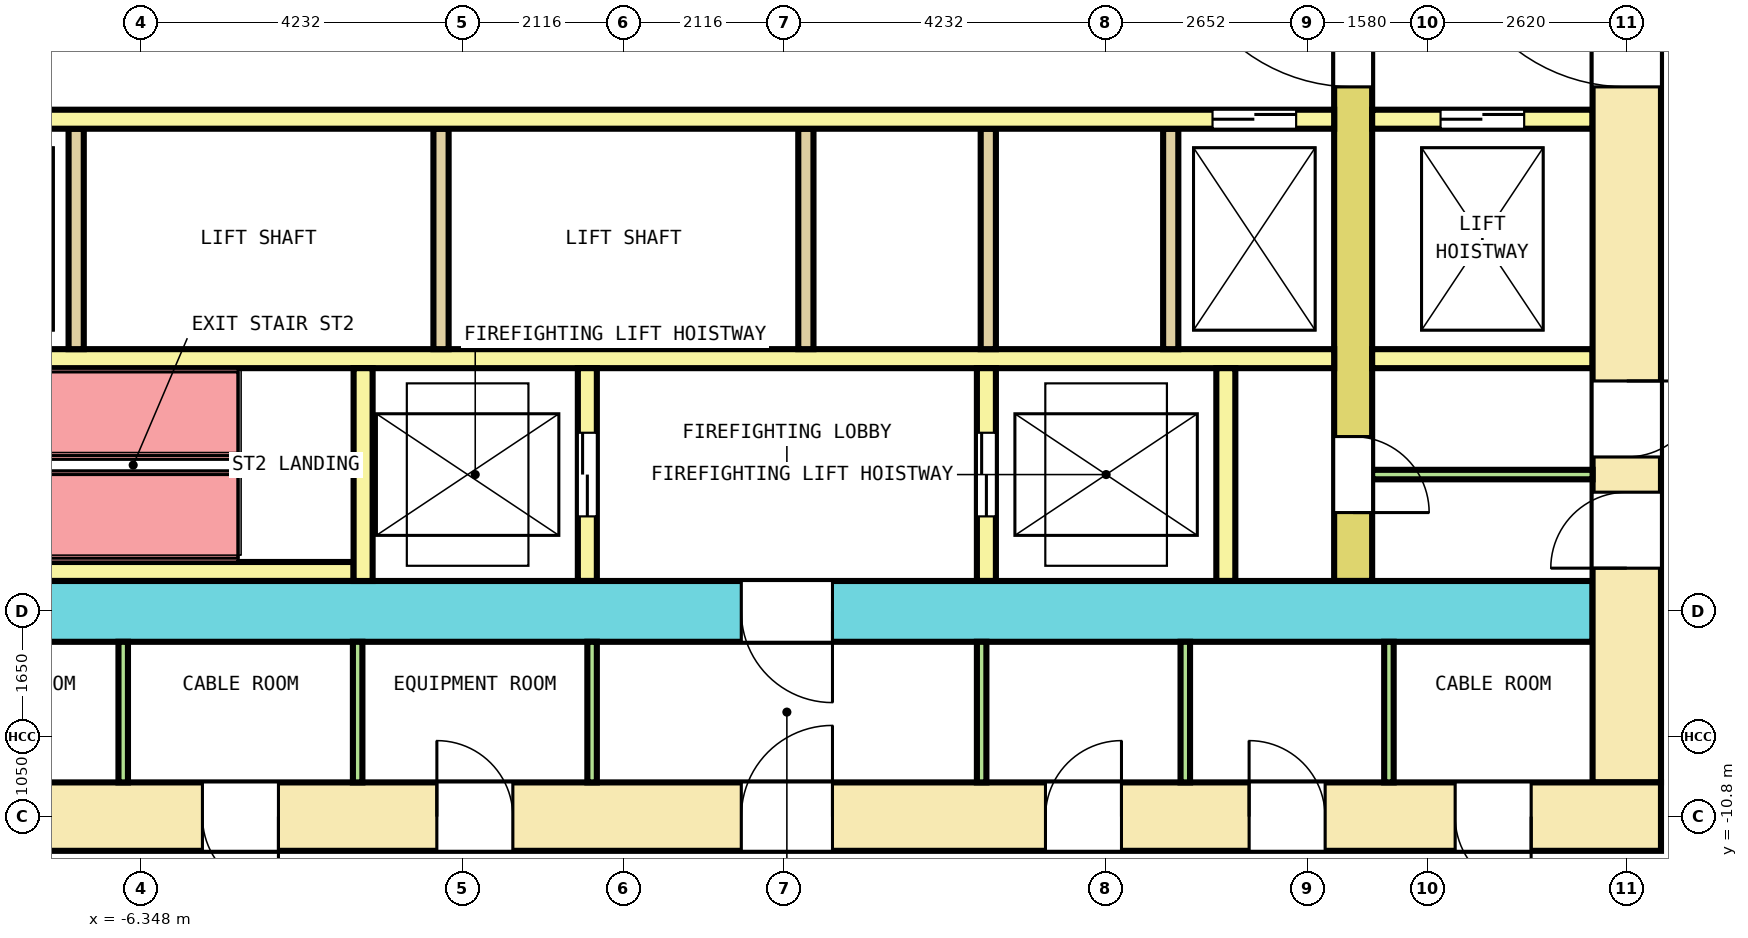
"""IFC4 building model, lengths in metres.
Left out: names, types, materials, properties, quantities, classifications, styles, units other than length and angle.
Written with IfcOpenShell. Run it as: python <this file> out.ifc"""

import sys

from ifc_helpers import new_model, si_unit, direction, frame, frame_2d, origin, place, context, subcontext, project, spatial, rectangle, extrude, element, fill, save


model = new_model("IFC4")
c1 = context("Model", 3, precision=1e-05, world=origin(), true_north=direction((0.0, 1.0)))
c2 = subcontext(c1, "Body", "Model", "MODEL_VIEW")
j1 = project(units=[si_unit("LENGTHUNIT", "METRE"), si_unit("PLANEANGLEUNIT", "RADIAN")], contexts=[c1])
p1 = place(None, origin())
s1 = spatial("IfcSite", under=j1, at=p1, CompositionType="ELEMENT")
p2 = place(p1, origin())
s2 = spatial("IfcBuilding", under=s1, at=p2, CompositionType="ELEMENT")
p3 = place(p2, frame((0.0, 0.0, 54.2)))
s3 = spatial("IfcBuildingStorey", under=s2, at=p3, CompositionType="ELEMENT", Elevation=54.2)
p4 = place(p3, frame((-13.65, -10.8, 0.0), z_axis=(0.0, 0.0, 1.0), x_axis=(1.0, 0.0, 0.0)))
e1 = element("IfcWall", 1, at=p4, inside=s3, PredefinedType="SHEAR", context=c2, shape_type="SweptSolid", body=[
    extrude(rectangle(XDim=27.3, YDim=0.9, at=frame_2d((13.65, 0.0))), origin(), (0.0, 0.0, 1.0), 4.1),
])
p5 = place(p4, frame((1.911, 0.0, 0.0)))
e2 = element("IfcOpeningElement", 2, at=p5, cuts=e1, PredefinedType="OPENING", context=c2, shape_type="SweptSolid", body=[
    extrude(rectangle(XDim=1.0, YDim=2.1, at=frame_2d((0.5, 1.05))), frame((0.0, 0.46, 0.0), z_axis=(0.0, -1.0, 0.0), x_axis=(1.0, 0.0, 0.0)), (0.0, 0.0, 1.0), 0.92),
])
p6 = place(p4, frame((5.027, 0.0, 0.0)))
e3 = element("IfcOpeningElement", 3, at=p6, cuts=e1, PredefinedType="OPENING", context=c2, shape_type="SweptSolid", body=[
    extrude(rectangle(XDim=1.0, YDim=2.1, at=frame_2d((0.5, 1.05))), frame((0.0, 0.46, 0.0), z_axis=(0.0, -1.0, 0.0), x_axis=(1.0, 0.0, 0.0)), (0.0, 0.0, 1.0), 0.92),
])
p7 = place(p4, frame((8.111, 0.0, 0.0)))
e4 = element("IfcOpeningElement", 4, at=p7, cuts=e1, PredefinedType="OPENING", context=c2, shape_type="SweptSolid", body=[
    extrude(rectangle(XDim=1.0, YDim=2.1, at=frame_2d((0.5, 1.05))), frame((0.0, 0.46, 0.0), z_axis=(0.0, -1.0, 0.0), x_axis=(1.0, 0.0, 0.0)), (0.0, 0.0, 1.0), 0.92),
])
p8 = place(p4, frame((11.195, 0.0, 0.0)))
e5 = element("IfcOpeningElement", 5, at=p8, cuts=e1, PredefinedType="OPENING", context=c2, shape_type="SweptSolid", body=[
    extrude(rectangle(XDim=1.0, YDim=2.1, at=frame_2d((0.5, 1.05))), frame((0.0, 0.46, 0.0), z_axis=(0.0, -1.0, 0.0), x_axis=(1.0, 0.0, 0.0)), (0.0, 0.0, 1.0), 0.92),
])
p9 = place(p4, frame((19.202, 0.0, 0.0)))
e6 = element("IfcOpeningElement", 6, at=p9, cuts=e1, PredefinedType="OPENING", context=c2, shape_type="SweptSolid", body=[
    extrude(rectangle(XDim=1.0, YDim=2.1, at=frame_2d((0.5, 1.05))), frame((0.0, 0.46, 0.0), z_axis=(0.0, -1.0, 0.0), x_axis=(1.0, 0.0, 0.0)), (0.0, 0.0, 1.0), 0.92),
])
p10 = place(p4, frame((21.881, 0.0, 0.0)))
e7 = element("IfcOpeningElement", 7, at=p10, cuts=e1, PredefinedType="OPENING", context=c2, shape_type="SweptSolid", body=[
    extrude(rectangle(XDim=1.0, YDim=2.1, at=frame_2d((0.5, 1.05))), frame((0.0, 0.46, 0.0), z_axis=(0.0, -1.0, 0.0), x_axis=(1.0, 0.0, 0.0)), (0.0, 0.0, 1.0), 0.92),
])
p11 = place(p4, frame((24.592, 0.0, 0.0)))
e8 = element("IfcOpeningElement", 8, at=p11, cuts=e1, PredefinedType="OPENING", context=c2, shape_type="SweptSolid", body=[
    extrude(rectangle(XDim=1.0, YDim=2.1, at=frame_2d((0.5, 1.05))), frame((0.0, 0.46, 0.0), z_axis=(0.0, -1.0, 0.0), x_axis=(1.0, 0.0, 0.0)), (0.0, 0.0, 1.0), 0.92),
])
p12 = place(p4, frame((15.2, 0.0, 0.0)))
e9 = element("IfcOpeningElement", 9, at=p12, cuts=e1, PredefinedType="OPENING", context=c2, shape_type="SweptSolid", body=[
    extrude(rectangle(XDim=1.2, YDim=2.1, at=frame_2d((0.6, 1.05))), frame((0.0, 0.46, 0.0), z_axis=(0.0, -1.0, 0.0), x_axis=(1.0, 0.0, 0.0)), (0.0, 0.0, 1.0), 0.92),
])
p13 = place(p3, frame((13.2, -10.35, 0.0), z_axis=(0.0, 0.0, 1.0), x_axis=(0.0, 1.0, 0.0)))
e10 = element("IfcWall", 10, at=p13, inside=s3, PredefinedType="SHEAR", context=c2, shape_type="SweptSolid", body=[
    extrude(rectangle(XDim=20.7, YDim=0.9, at=frame_2d((10.35, 0.0))), origin(), (0.0, 0.0, 1.0), 4.1),
])
p14 = place(p13, frame((9.15, 0.0, 0.0)))
e11 = element("IfcOpeningElement", 11, at=p14, cuts=e10, PredefinedType="OPENING", context=c2, shape_type="SweptSolid", body=[
    extrude(rectangle(XDim=2.4, YDim=2.1, at=frame_2d((1.2, 1.05))), frame((0.0, 0.46, 0.0), z_axis=(0.0, -1.0, 0.0), x_axis=(1.0, 0.0, 0.0)), (0.0, 0.0, 1.0), 0.92),
])
p15 = place(p13, frame((16.05, 0.0, 0.0)))
e12 = element("IfcOpeningElement", 12, at=p15, cuts=e10, PredefinedType="OPENING", context=c2, shape_type="SweptSolid", body=[
    extrude(rectangle(XDim=1.2, YDim=2.1, at=frame_2d((0.6, 1.05))), frame((0.0, 0.46, 0.0), z_axis=(0.0, -1.0, 0.0), x_axis=(1.0, 0.0, 0.0)), (0.0, 0.0, 1.0), 0.92),
])
p16 = place(p13, frame((2.819, 0.0, 0.0)))
e13 = element("IfcOpeningElement", 13, at=p16, cuts=e10, PredefinedType="OPENING", context=c2, shape_type="SweptSolid", body=[
    extrude(rectangle(XDim=1.0, YDim=2.1, at=frame_2d((0.5, 1.05))), frame((0.0, 0.46, 0.0), z_axis=(0.0, -1.0, 0.0), x_axis=(1.0, 0.0, 0.0)), (0.0, 0.0, 1.0), 0.92),
])
p17 = place(p13, frame((4.281, 0.0, 0.0)))
e14 = element("IfcOpeningElement", 14, at=p17, cuts=e10, PredefinedType="OPENING", context=c2, shape_type="SweptSolid", body=[
    extrude(rectangle(XDim=1.0, YDim=2.1, at=frame_2d((0.5, 1.05))), frame((0.0, 0.46, 0.0), z_axis=(0.0, -1.0, 0.0), x_axis=(1.0, 0.0, 0.0)), (0.0, 0.0, 1.0), 0.92),
])
p18 = place(p3, frame((-12.75, -8.1, 0.0), z_axis=(0.0, 0.0, 1.0), x_axis=(1.0, 0.0, 0.0)))
e15 = element("IfcWall", 15, at=p18, inside=s3, PredefinedType="SHEAR", context=c2, shape_type="SweptSolid", body=[
    extrude(rectangle(XDim=25.5, YDim=0.8, at=frame_2d((12.75, 0.0))), origin(), (0.0, 0.0, 1.0), 4.1),
])
p19 = place(p18, frame((14.3, 0.0, 0.0)))
e16 = element("IfcOpeningElement", 16, at=p19, cuts=e15, PredefinedType="OPENING", context=c2, shape_type="SweptSolid", body=[
    extrude(rectangle(XDim=1.2, YDim=2.1, at=frame_2d((0.6, 1.05))), frame((0.0, 0.41, 0.0), z_axis=(0.0, -1.0, 0.0), x_axis=(1.0, 0.0, 0.0)), (0.0, 0.0, 1.0), 0.82),
])
p20 = place(p3, frame((9.6, -7.7, 0.0), z_axis=(0.0, 0.0, 1.0), x_axis=(0.0, 1.0, 0.0)))
e17 = element("IfcWall", 17, at=p20, inside=s3, PredefinedType="SHEAR", context=c2, shape_type="SweptSolid", body=[
    extrude(rectangle(XDim=15.4, YDim=0.5, at=frame_2d((7.7, 0.0))), origin(), (0.0, 0.0, 1.0), 4.1),
])
p21 = place(p20, frame((6.5, 0.0, 0.0)))
e18 = element("IfcOpeningElement", 18, at=p21, cuts=e17, PredefinedType="OPENING", context=c2, shape_type="SweptSolid", body=[
    extrude(rectangle(XDim=2.4, YDim=2.1, at=frame_2d((1.2, 1.05))), frame((0.0, 0.26, 0.0), z_axis=(0.0, -1.0, 0.0), x_axis=(1.0, 0.0, 0.0)), (0.0, 0.0, 1.0), 0.52),
])
p22 = place(p20, frame((13.4, 0.0, 0.0)))
e19 = element("IfcOpeningElement", 19, at=p22, cuts=e17, PredefinedType="OPENING", context=c2, shape_type="SweptSolid", body=[
    extrude(rectangle(XDim=1.2, YDim=2.1, at=frame_2d((0.6, 1.05))), frame((0.0, 0.26, 0.0), z_axis=(0.0, -1.0, 0.0), x_axis=(1.0, 0.0, 0.0)), (0.0, 0.0, 1.0), 0.52),
])
p23 = place(p20, frame((0.9, 0.0, 0.0)))
e20 = element("IfcOpeningElement", 20, at=p23, cuts=e17, PredefinedType="OPENING", context=c2, shape_type="SweptSolid", body=[
    extrude(rectangle(XDim=1.0, YDim=2.1, at=frame_2d((0.5, 1.05))), frame((0.0, 0.26, 0.0), z_axis=(0.0, -1.0, 0.0), x_axis=(1.0, 0.0, 0.0)), (0.0, 0.0, 1.0), 0.52),
])
p24 = place(p3, frame((-9.35, -1.625, 0.0), z_axis=(0.0, 0.0, 1.0), x_axis=(1.0, 0.0, 0.0)))
e21 = element("IfcWall", 21, at=p24, inside=s3, PredefinedType="SOLIDWALL", context=c2, shape_type="SweptSolid", body=[
    extrude(rectangle(XDim=18.7, YDim=0.25, at=frame_2d((9.35, 0.0))), origin(), (0.0, 0.0, 1.0), 4.1),
])
p25 = place(p24, frame((0.5, 0.0, 0.0)))
e22 = element("IfcOpeningElement", 22, at=p25, cuts=e21, PredefinedType="OPENING", context=c2, shape_type="SweptSolid", body=[
    extrude(rectangle(XDim=1.1, YDim=2.1, at=frame_2d((0.55, 1.05))), frame((0.0, 0.135, 0.0), z_axis=(0.0, -1.0, 0.0), x_axis=(1.0, 0.0, 0.0)), (0.0, 0.0, 1.0), 0.27),
])
p26 = place(p24, frame((17.1, 0.0, 0.0)))
e23 = element("IfcOpeningElement", 23, at=p26, cuts=e21, PredefinedType="OPENING", context=c2, shape_type="SweptSolid", body=[
    extrude(rectangle(XDim=1.1, YDim=2.1, at=frame_2d((0.55, 1.05))), frame((0.0, 0.135, 0.0), z_axis=(0.0, -1.0, 0.0), x_axis=(1.0, 0.0, 0.0)), (0.0, 0.0, 1.0), 0.27),
])
p27 = place(p3, frame((9.85, -1.625, 0.0), z_axis=(0.0, 0.0, 1.0), x_axis=(1.0, 0.0, 0.0)))
e24 = element("IfcWall", 24, at=p27, inside=s3, PredefinedType="SOLIDWALL", context=c2, shape_type="SweptSolid", body=[
    extrude(rectangle(XDim=2.9, YDim=0.25, at=frame_2d((1.45, 0.0))), origin(), (0.0, 0.0, 1.0), 4.1),
])
p28 = place(p27, frame((0.9, 0.0, 0.0)))
e25 = element("IfcOpeningElement", 25, at=p28, cuts=e24, PredefinedType="OPENING", context=c2, shape_type="SweptSolid", body=[
    extrude(rectangle(XDim=1.1, YDim=2.1, at=frame_2d((0.55, 1.05))), frame((0.0, 0.135, 0.0), z_axis=(0.0, -1.0, 0.0), x_axis=(1.0, 0.0, 0.0)), (0.0, 0.0, 1.0), 0.27),
])
p29 = place(p3, frame((-9.35, -4.775, 0.0), z_axis=(0.0, 0.0, 1.0), x_axis=(1.0, 0.0, 0.0)))
e26 = element("IfcWall", 26, at=p29, inside=s3, PredefinedType="SOLIDWALL", context=c2, shape_type="SweptSolid", body=[
    extrude(rectangle(XDim=18.7, YDim=0.25, at=frame_2d((9.35, 0.0))), origin(), (0.0, 0.0, 1.0), 4.1),
])
p30 = place(p3, frame((9.85, -4.775, 0.0), z_axis=(0.0, 0.0, 1.0), x_axis=(1.0, 0.0, 0.0)))
e27 = element("IfcWall", 27, at=p30, inside=s3, PredefinedType="SOLIDWALL", context=c2, shape_type="SweptSolid", body=[
    extrude(rectangle(XDim=2.9, YDim=0.25, at=frame_2d((1.45, 0.0))), origin(), (0.0, 0.0, 1.0), 4.1),
])
for number, where, z_axis, x_axis in (
    (28, (-7.2, -4.65, 0.0), (0.0, 0.0, 1.0), (0.0, 1.0, 0.0)),
    (29, (-2.4, -4.65, 0.0), (0.0, 0.0, 1.0), (0.0, 1.0, 0.0)),
    (30, (2.4, -4.65, 0.0), (0.0, 0.0, 1.0), (0.0, 1.0, 0.0)),
    (31, (4.8, -4.65, 0.0), (0.0, 0.0, 1.0), (0.0, 1.0, 0.0)),
    (32, (7.2, -4.65, 0.0), (0.0, 0.0, 1.0), (0.0, 1.0, 0.0)),
):
    element("IfcWall", number, at=place(p3, frame(where, z_axis=z_axis, x_axis=x_axis)), inside=s3, PredefinedType="SOLIDWALL", context=c2, shape_type="SweptSolid", body=[
        extrude(rectangle(XDim=2.9, YDim=0.2, at=frame_2d((1.45, 0.0))), origin(), (0.0, 0.0, 1.0), 4.1),
    ])
p31 = place(p3, frame((-9.35, -7.575, 0.0), z_axis=(0.0, 0.0, 1.0), x_axis=(1.0, 0.0, 0.0)))
e33 = element("IfcWall", 33, at=p31, inside=s3, PredefinedType="SOLIDWALL", context=c2, shape_type="SweptSolid", body=[
    extrude(rectangle(XDim=5.8, YDim=0.25, at=frame_2d((2.9, 0.0))), origin(), (0.0, 0.0, 1.0), 4.1),
])
p32 = place(p3, frame((-3.425, -7.7, 0.0), z_axis=(0.0, 0.0, 1.0), x_axis=(0.0, 1.0, 0.0)))
e34 = element("IfcWall", 34, at=p32, inside=s3, PredefinedType="SOLIDWALL", context=c2, shape_type="SweptSolid", body=[
    extrude(rectangle(XDim=2.8, YDim=0.25, at=frame_2d((1.4, 0.0))), origin(), (0.0, 0.0, 1.0), 4.1),
])
p33 = place(p3, frame((-0.475, -7.7, 0.0), z_axis=(0.0, 0.0, 1.0), x_axis=(0.0, 1.0, 0.0)))
e35 = element("IfcWall", 35, at=p33, inside=s3, PredefinedType="SOLIDWALL", context=c2, shape_type="SweptSolid", body=[
    extrude(rectangle(XDim=2.8, YDim=0.25, at=frame_2d((1.4, 0.0))), origin(), (0.0, 0.0, 1.0), 4.1),
])
p34 = place(p33, frame((0.85, 0.0, 0.0)))
e36 = element("IfcOpeningElement", 36, at=p34, cuts=e35, PredefinedType="OPENING", context=c2, shape_type="SweptSolid", body=[
    extrude(rectangle(XDim=1.1, YDim=2.1, at=frame_2d((0.55, 1.05))), frame((0.0, 0.135, 0.0), z_axis=(0.0, -1.0, 0.0), x_axis=(1.0, 0.0, 0.0)), (0.0, 0.0, 1.0), 0.27),
])
p35 = place(p3, frame((4.775, -7.7, 0.0), z_axis=(0.0, 0.0, 1.0), x_axis=(0.0, 1.0, 0.0)))
e37 = element("IfcWall", 37, at=p35, inside=s3, PredefinedType="SOLIDWALL", context=c2, shape_type="SweptSolid", body=[
    extrude(rectangle(XDim=2.8, YDim=0.25, at=frame_2d((1.4, 0.0))), origin(), (0.0, 0.0, 1.0), 4.1),
])
p36 = place(p35, frame((0.85, 0.0, 0.0)))
e38 = element("IfcOpeningElement", 38, at=p36, cuts=e37, PredefinedType="OPENING", context=c2, shape_type="SweptSolid", body=[
    extrude(rectangle(XDim=1.1, YDim=2.1, at=frame_2d((0.55, 1.05))), frame((0.0, 0.135, 0.0), z_axis=(0.0, -1.0, 0.0), x_axis=(1.0, 0.0, 0.0)), (0.0, 0.0, 1.0), 0.27),
])
p37 = place(p3, frame((7.925, -7.7, 0.0), z_axis=(0.0, 0.0, 1.0), x_axis=(0.0, 1.0, 0.0)))
e39 = element("IfcWall", 39, at=p37, inside=s3, PredefinedType="SOLIDWALL", context=c2, shape_type="SweptSolid", body=[
    extrude(rectangle(XDim=2.8, YDim=0.25, at=frame_2d((1.4, 0.0))), origin(), (0.0, 0.0, 1.0), 4.1),
])
p38 = place(p3, frame((9.85, -6.3, 0.0), z_axis=(0.0, 0.0, 1.0), x_axis=(1.0, 0.0, 0.0)))
e40 = element("IfcWall", 40, at=p38, inside=s3, PredefinedType="PARTITIONING", context=c2, shape_type="SweptSolid", body=[
    extrude(rectangle(XDim=2.9, YDim=0.125, at=frame_2d((1.45, 0.0))), origin(), (0.0, 0.0, 1.0), 4.1),
])
for number, where, z_axis, x_axis in (
    (41, (-6.581, -10.35, 0.0), (0.0, 0.0, 1.0), (0.0, 1.0, 0.0)),
    (42, (-3.497, -10.35, 0.0), (0.0, 0.0, 1.0), (0.0, 1.0, 0.0)),
    (43, (-0.413, -10.35, 0.0), (0.0, 0.0, 1.0), (0.0, 1.0, 0.0)),
    (44, (4.712, -10.35, 0.0), (0.0, 0.0, 1.0), (0.0, 1.0, 0.0)),
    (45, (7.392, -10.35, 0.0), (0.0, 0.0, 1.0), (0.0, 1.0, 0.0)),
    (46, (10.071, -10.35, 0.0), (0.0, 0.0, 1.0), (0.0, 1.0, 0.0)),
):
    element("IfcWall", number, at=place(p3, frame(where, z_axis=z_axis, x_axis=x_axis)), inside=s3, PredefinedType="PARTITIONING", context=c2, shape_type="SweptSolid", body=[
        extrude(rectangle(XDim=1.85, YDim=0.125, at=frame_2d((0.925, 0.0))), origin(), (0.0, 0.0, 1.0), 4.1),
    ])
p39 = place(p26, origin())
e47 = element("IfcDoor", 47, at=p39, inside=s3, OperationType="DOUBLE_DOOR_SLIDING", PredefinedType="DOOR", context=c2, shape_type="SweptSolid", body=[
    extrude(rectangle(XDim=1.1, YDim=2.1, at=frame_2d((0.55, 1.05))), frame((0.0, 0.075, 0.0), z_axis=(0.0, -1.0, 0.0), x_axis=(1.0, 0.0, 0.0)), (0.0, 0.0, 1.0), 0.15),
])
fill(e23, e47)
p40 = place(p28, origin())
e48 = element("IfcDoor", 48, at=p40, inside=s3, OperationType="DOUBLE_DOOR_SLIDING", PredefinedType="DOOR", context=c2, shape_type="SweptSolid", body=[
    extrude(rectangle(XDim=1.1, YDim=2.1, at=frame_2d((0.55, 1.05))), frame((0.0, 0.075, 0.0), z_axis=(0.0, -1.0, 0.0), x_axis=(1.0, 0.0, 0.0)), (0.0, 0.0, 1.0), 0.15),
])
fill(e25, e48)
p41 = place(p34, origin())
e49 = element("IfcDoor", 49, at=p41, inside=s3, OperationType="DOUBLE_DOOR_SLIDING", PredefinedType="DOOR", context=c2, shape_type="SweptSolid", body=[
    extrude(rectangle(XDim=1.1, YDim=2.1, at=frame_2d((0.55, 1.05))), frame((0.0, 0.075, 0.0), z_axis=(0.0, -1.0, 0.0), x_axis=(1.0, 0.0, 0.0)), (0.0, 0.0, 1.0), 0.15),
])
fill(e36, e49)
p42 = place(p36, origin())
e50 = element("IfcDoor", 50, at=p42, inside=s3, OperationType="DOUBLE_DOOR_SLIDING", PredefinedType="DOOR", context=c2, shape_type="SweptSolid", body=[
    extrude(rectangle(XDim=1.1, YDim=2.1, at=frame_2d((0.55, 1.05))), frame((0.0, 0.075, 0.0), z_axis=(0.0, -1.0, 0.0), x_axis=(1.0, 0.0, 0.0)), (0.0, 0.0, 1.0), 0.15),
])
fill(e38, e50)
p43 = place(p21, origin())
e51 = element("IfcDoor", 51, at=p43, inside=s3, OperationType="DOUBLE_DOOR_SINGLE_SWING", PredefinedType="DOOR", context=c2, shape_type="SweptSolid", body=[
    extrude(rectangle(XDim=2.4, YDim=2.1, at=frame_2d((1.2, 1.05))), frame((0.0, 0.2, 0.0), z_axis=(0.0, -1.0, 0.0), x_axis=(1.0, 0.0, 0.0)), (0.0, 0.0, 1.0), 0.4),
])
fill(e18, e51)
p44 = place(p14, origin())
e52 = element("IfcDoor", 52, at=p44, inside=s3, OperationType="DOUBLE_DOOR_SINGLE_SWING", PredefinedType="DOOR", context=c2, shape_type="SweptSolid", body=[
    extrude(rectangle(XDim=2.4, YDim=2.1, at=frame_2d((1.2, 1.05))), frame((0.0, 0.3, 0.0), z_axis=(0.0, -1.0, 0.0), x_axis=(1.0, 0.0, 0.0)), (0.0, 0.0, 1.0), 0.6),
])
fill(e11, e52)
p45 = place(p19, origin())
e53 = element("IfcDoor", 53, at=p45, inside=s3, OperationType="SINGLE_SWING_LEFT", PredefinedType="DOOR", context=c2, shape_type="SweptSolid", body=[
    extrude(rectangle(XDim=1.2, YDim=2.1, at=frame_2d((0.6, 1.05))), frame((0.0, 0.3, 0.0), z_axis=(0.0, -1.0, 0.0), x_axis=(1.0, 0.0, 0.0)), (0.0, 0.0, 1.0), 0.6),
])
fill(e16, e53)
p46 = place(p23, origin())
e54 = element("IfcDoor", 54, at=p46, inside=s3, OperationType="SINGLE_SWING_LEFT", PredefinedType="DOOR", context=c2, shape_type="SweptSolid", body=[
    extrude(rectangle(XDim=1.0, YDim=2.1, at=frame_2d((0.5, 1.05))), frame((0.0, 0.2, 0.0), z_axis=(0.0, -1.0, 0.0), x_axis=(1.0, 0.0, 0.0)), (0.0, 0.0, 1.0), 0.4),
])
fill(e20, e54)
p47 = place(p16, origin())
e55 = element("IfcDoor", 55, at=p47, inside=s3, OperationType="SINGLE_SWING_RIGHT", PredefinedType="DOOR", context=c2, shape_type="SweptSolid", body=[
    extrude(rectangle(XDim=1.0, YDim=2.1, at=frame_2d((0.5, 1.05))), frame((0.0, 0.3, 0.0), z_axis=(0.0, -1.0, 0.0), x_axis=(1.0, 0.0, 0.0)), (0.0, 0.0, 1.0), 0.6),
])
fill(e13, e55)
p48 = place(p17, origin())
e56 = element("IfcDoor", 56, at=p48, inside=s3, OperationType="SINGLE_SWING_LEFT", PredefinedType="DOOR", context=c2, shape_type="SweptSolid", body=[
    extrude(rectangle(XDim=1.0, YDim=2.1, at=frame_2d((0.5, 1.05))), frame((0.0, 0.3, 0.0), z_axis=(0.0, -1.0, 0.0), x_axis=(1.0, 0.0, 0.0)), (0.0, 0.0, 1.0), 0.6),
])
fill(e14, e56)
p49 = place(p7, origin())
e57 = element("IfcDoor", 57, at=p49, inside=s3, OperationType="SINGLE_SWING_LEFT", PredefinedType="DOOR", context=c2, shape_type="SweptSolid", body=[
    extrude(rectangle(XDim=1.0, YDim=2.1, at=frame_2d((0.5, 1.05))), frame((0.0, 0.3, 0.0), z_axis=(0.0, -1.0, 0.0), x_axis=(1.0, 0.0, 0.0)), (0.0, 0.0, 1.0), 0.6),
])
fill(e4, e57)
p50 = place(p8, origin())
e58 = element("IfcDoor", 58, at=p50, inside=s3, OperationType="SINGLE_SWING_RIGHT", PredefinedType="DOOR", context=c2, shape_type="SweptSolid", body=[
    extrude(rectangle(XDim=1.0, YDim=2.1, at=frame_2d((0.5, 1.05))), frame((0.0, 0.3, 0.0), z_axis=(0.0, -1.0, 0.0), x_axis=(1.0, 0.0, 0.0)), (0.0, 0.0, 1.0), 0.6),
])
fill(e5, e58)
p51 = place(p9, origin())
e59 = element("IfcDoor", 59, at=p51, inside=s3, OperationType="SINGLE_SWING_LEFT", PredefinedType="DOOR", context=c2, shape_type="SweptSolid", body=[
    extrude(rectangle(XDim=1.0, YDim=2.1, at=frame_2d((0.5, 1.05))), frame((0.0, 0.3, 0.0), z_axis=(0.0, -1.0, 0.0), x_axis=(1.0, 0.0, 0.0)), (0.0, 0.0, 1.0), 0.6),
])
fill(e6, e59)
p52 = place(p10, origin())
e60 = element("IfcDoor", 60, at=p52, inside=s3, OperationType="SINGLE_SWING_RIGHT", PredefinedType="DOOR", context=c2, shape_type="SweptSolid", body=[
    extrude(rectangle(XDim=1.0, YDim=2.1, at=frame_2d((0.5, 1.05))), frame((0.0, 0.3, 0.0), z_axis=(0.0, -1.0, 0.0), x_axis=(1.0, 0.0, 0.0)), (0.0, 0.0, 1.0), 0.6),
])
fill(e7, e60)
p53 = place(p11, origin())
e61 = element("IfcDoor", 61, at=p53, inside=s3, OperationType="SINGLE_SWING_LEFT", PredefinedType="DOOR", context=c2, shape_type="SweptSolid", body=[
    extrude(rectangle(XDim=1.0, YDim=2.1, at=frame_2d((0.5, 1.05))), frame((0.0, 0.3, 0.0), z_axis=(0.0, -1.0, 0.0), x_axis=(1.0, 0.0, 0.0)), (0.0, 0.0, 1.0), 0.6),
])
fill(e8, e61)
p54 = place(p12, origin())
e62 = element("IfcDoor", 62, at=p54, inside=s3, OperationType="SINGLE_SWING_RIGHT", PredefinedType="DOOR", context=c2, shape_type="SweptSolid", body=[
    extrude(rectangle(XDim=1.2, YDim=2.1, at=frame_2d((0.6, 1.05))), frame((0.0, 0.3, 0.0), z_axis=(0.0, -1.0, 0.0), x_axis=(1.0, 0.0, 0.0)), (0.0, 0.0, 1.0), 0.6),
])
fill(e9, e62)
save(model, sys.argv[1])
